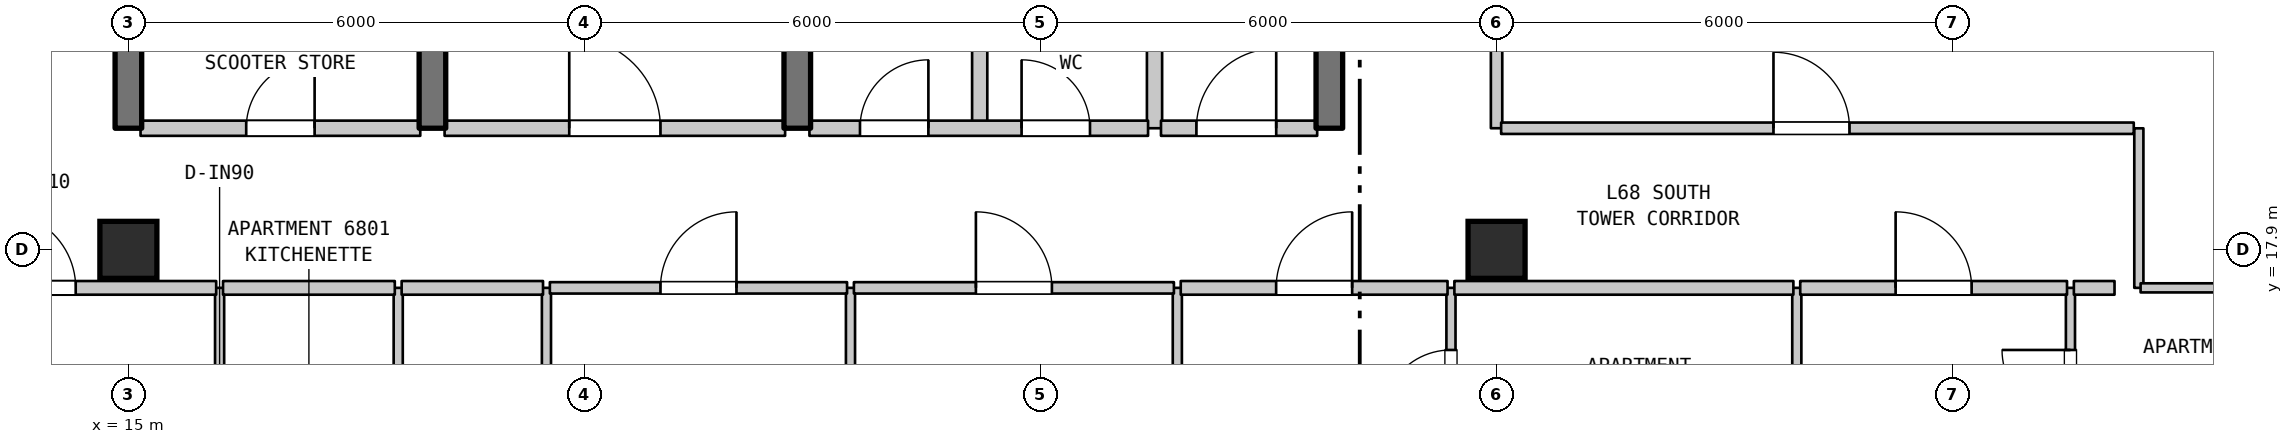
"""IFC4 building model, lengths in metres.
Left out: names, types, materials, properties, quantities, classifications, styles, units other than length and angle.
Written with IfcOpenShell. Run it as: python <this file> out.ifc"""

import sys

from ifc_helpers import new_model, si_unit, direction, frame, frame_2d, origin, origin_2d, place, context, subcontext, project, spatial, rectangle, extrude, element, fill, save


model = new_model("IFC4")
c1 = context("Model", 3, precision=1e-05, world=origin(), true_north=direction((0.0, 1.0)))
c2 = subcontext(c1, "Body", "Model", "MODEL_VIEW")
j1 = project(units=[si_unit("LENGTHUNIT", "METRE"), si_unit("PLANEANGLEUNIT", "RADIAN")], contexts=[c1])
p1 = place(None, origin())
s1 = spatial("IfcSite", under=j1, at=p1, CompositionType="ELEMENT")
p2 = place(p1, origin())
s2 = spatial("IfcBuilding", under=s1, at=p2, CompositionType="ELEMENT")
p3 = place(p2, frame((0.0, 0.0, 273.2)))
s3 = spatial("IfcBuildingStorey", under=s2, at=p3, CompositionType="ELEMENT", Elevation=273.2)
for number, where, z_axis, x_axis in (
    (1, (15.0, 17.9, 0.0), (0.0, 0.0, 1.0), (1.0, 0.0, 0.0)),
    (2, (33.0, 17.9, 0.0), (0.0, 0.0, 1.0), (1.0, 0.0, 0.0)),
):
    element("IfcColumn", number, at=place(p3, frame(where, z_axis=z_axis, x_axis=x_axis)), inside=s3, PredefinedType="COLUMN", context=c2, shape_type="SweptSolid", body=[
        extrude(rectangle(XDim=0.75, YDim=0.75, at=origin_2d()), origin(), (0.0, 0.0, 1.0), 3.7),
    ])
p4 = place(p3, frame((15.0, 19.5, 0.0), z_axis=(0.0, 0.0, 1.0), x_axis=(0.0, 1.0, 0.0)))
e3 = element("IfcWall", 3, at=p4, inside=s3, PredefinedType="SHEAR", context=c2, shape_type="SweptSolid", body=[
    extrude(rectangle(XDim=3.2, YDim=0.35, at=frame_2d((1.6, 0.0))), origin(), (0.0, 0.0, 1.0), 3.39),
])
p5 = place(p3, frame((16.2, 14.2, 0.0), z_axis=(0.0, 0.0, 1.0), x_axis=(0.0, 1.0, 0.0)))
e4 = element("IfcWall", 4, at=p5, inside=s3, PredefinedType="PARTITIONING", context=c2, shape_type="SweptSolid", body=[
    extrude(rectangle(XDim=3.2, YDim=0.12, at=frame_2d((1.6, 0.0))), origin(), (0.0, 0.0, 1.0), 3.39),
])
p6 = place(p5, frame((1.15, 0.0, 0.0)))
e5 = element("IfcOpeningElement", 5, at=p6, cuts=e4, PredefinedType="OPENING", context=c2, shape_type="SweptSolid", body=[
    extrude(rectangle(XDim=0.9, YDim=2.15, at=frame_2d((0.45, 1.075))), frame((0.0, 0.07, 0.0), z_axis=(0.0, -1.0, 0.0), x_axis=(1.0, 0.0, 0.0)), (0.0, 0.0, 1.0), 0.14),
])
p7 = place(p3, frame((18.55, 14.2, 0.0), z_axis=(0.0, 0.0, 1.0), x_axis=(0.0, 1.0, 0.0)))
e6 = element("IfcWall", 6, at=p7, inside=s3, PredefinedType="PARTITIONING", context=c2, shape_type="SweptSolid", body=[
    extrude(rectangle(XDim=3.2, YDim=0.12, at=frame_2d((1.6, 0.0))), origin(), (0.0, 0.0, 1.0), 3.39),
])
p8 = place(p3, frame((19.0, 19.5, 0.0), z_axis=(0.0, 0.0, 1.0), x_axis=(0.0, 1.0, 0.0)))
e7 = element("IfcWall", 7, at=p8, inside=s3, PredefinedType="SHEAR", context=c2, shape_type="SweptSolid", body=[
    extrude(rectangle(XDim=3.2, YDim=0.35, at=frame_2d((1.6, 0.0))), origin(), (0.0, 0.0, 1.0), 3.39),
])
p9 = place(p3, frame((20.5, 7.189, 0.0), z_axis=(0.0, 0.0, 1.0), x_axis=(0.0, 1.0, 0.0)))
e8 = element("IfcWall", 8, at=p9, inside=s3, PredefinedType="PARTITIONING", context=c2, shape_type="SweptSolid", body=[
    extrude(rectangle(XDim=10.211, YDim=0.12, at=frame_2d((5.105, 0.0))), origin(), (0.0, 0.0, 1.0), 3.39),
])
p10 = place(p3, frame((23.8, 19.5, 0.0), z_axis=(0.0, 0.0, 1.0), x_axis=(0.0, 1.0, 0.0)))
e9 = element("IfcWall", 9, at=p10, inside=s3, PredefinedType="SHEAR", context=c2, shape_type="SweptSolid", body=[
    extrude(rectangle(XDim=3.2, YDim=0.35, at=frame_2d((1.6, 0.0))), origin(), (0.0, 0.0, 1.0), 3.39),
])
p11 = place(p3, frame((24.5, 6.71, 0.0), z_axis=(0.0, 0.0, 1.0), x_axis=(0.0, 1.0, 0.0)))
e10 = element("IfcWall", 10, at=p11, inside=s3, PredefinedType="PARTITIONING", context=c2, shape_type="SweptSolid", body=[
    extrude(rectangle(XDim=10.69, YDim=0.12, at=frame_2d((5.345, 0.0))), origin(), (0.0, 0.0, 1.0), 3.39),
])
for number, where, z_axis, x_axis in (
    (11, (26.2, 19.5, 0.0), (0.0, 0.0, 1.0), (0.0, 1.0, 0.0)),
    (12, (28.5, 19.5, 0.0), (0.0, 0.0, 1.0), (0.0, 1.0, 0.0)),
):
    element("IfcWall", number, at=place(p3, frame(where, z_axis=z_axis, x_axis=x_axis)), inside=s3, PredefinedType="STANDARD", context=c2, shape_type="SweptSolid", body=[
        extrude(rectangle(XDim=3.2, YDim=0.2, at=frame_2d((1.6, 0.0))), origin(), (0.0, 0.0, 1.0), 3.39),
    ])
p12 = place(p3, frame((28.8, 6.71, 0.0), z_axis=(0.0, 0.0, 1.0), x_axis=(0.0, 1.0, 0.0)))
e13 = element("IfcWall", 13, at=p12, inside=s3, PredefinedType="PARTITIONING", context=c2, shape_type="SweptSolid", body=[
    extrude(rectangle(XDim=10.69, YDim=0.12, at=frame_2d((5.345, 0.0))), origin(), (0.0, 0.0, 1.0), 3.39),
])
p13 = place(p3, frame((30.8, 19.5, 0.0), z_axis=(0.0, 0.0, 1.0), x_axis=(0.0, 1.0, 0.0)))
e14 = element("IfcWall", 14, at=p13, inside=s3, PredefinedType="SHEAR", context=c2, shape_type="SweptSolid", body=[
    extrude(rectangle(XDim=3.2, YDim=0.35, at=frame_2d((1.6, 0.0))), origin(), (0.0, 0.0, 1.0), 3.39),
])
p14 = place(p3, frame((32.4, 15.008, 0.0), z_axis=(0.0, 0.0, 1.0), x_axis=(0.0, 1.0, 0.0)))
e15 = element("IfcWall", 15, at=p14, inside=s3, PredefinedType="PARTITIONING", context=c2, shape_type="SweptSolid", body=[
    extrude(rectangle(XDim=2.392, YDim=0.12, at=frame_2d((1.196, 0.0))), origin(), (0.0, 0.0, 1.0), 3.39),
])
p15 = place(p14, frame((0.675, 0.0, 0.0)))
e16 = element("IfcOpeningElement", 16, at=p15, cuts=e15, PredefinedType="OPENING", context=c2, shape_type="SweptSolid", body=[
    extrude(rectangle(XDim=0.9, YDim=2.1, at=frame_2d((0.45, 1.05))), frame((0.0, 0.07, 0.0), z_axis=(0.0, -1.0, 0.0), x_axis=(1.0, 0.0, 0.0)), (0.0, 0.0, 1.0), 0.14),
])
p16 = place(p3, frame((33.0, 19.5, 0.0), z_axis=(0.0, 0.0, 1.0), x_axis=(0.0, 1.0, 0.0)))
e17 = element("IfcWall", 17, at=p16, inside=s3, PredefinedType="STANDARD", context=c2, shape_type="SweptSolid", body=[
    extrude(rectangle(XDim=8.4, YDim=0.15, at=frame_2d((4.2, 0.0))), origin(), (0.0, 0.0, 1.0), 3.1),
])
p17 = place(p16, frame((5.18, 0.0, 0.0)))
e18 = element("IfcOpeningElement", 18, at=p17, cuts=e17, PredefinedType="OPENING", context=c2, shape_type="SweptSolid", body=[
    extrude(rectangle(XDim=1.0, YDim=2.15, at=frame_2d((0.5, 1.075))), frame((0.0, 0.085, 0.0), z_axis=(0.0, -1.0, 0.0), x_axis=(1.0, 0.0, 0.0)), (0.0, 0.0, 1.0), 0.17),
])
p18 = place(p3, frame((36.95, 15.008, 0.0), z_axis=(0.0, 0.0, 1.0), x_axis=(0.0, 1.0, 0.0)))
e19 = element("IfcWall", 19, at=p18, inside=s3, PredefinedType="PARTITIONING", context=c2, shape_type="SweptSolid", body=[
    extrude(rectangle(XDim=2.392, YDim=0.12, at=frame_2d((1.196, 0.0))), origin(), (0.0, 0.0, 1.0), 3.39),
])
p19 = place(p3, frame((40.55, 15.008, 0.0), z_axis=(0.0, 0.0, 1.0), x_axis=(0.0, 1.0, 0.0)))
e20 = element("IfcWall", 20, at=p19, inside=s3, PredefinedType="PARTITIONING", context=c2, shape_type="SweptSolid", body=[
    extrude(rectangle(XDim=2.392, YDim=0.12, at=frame_2d((1.196, 0.0))), origin(), (0.0, 0.0, 1.0), 3.39),
])
p20 = place(p19, frame((0.675, 0.0, 0.0)))
e21 = element("IfcOpeningElement", 21, at=p20, cuts=e20, PredefinedType="OPENING", context=c2, shape_type="SweptSolid", body=[
    extrude(rectangle(XDim=0.9, YDim=2.1, at=frame_2d((0.45, 1.05))), frame((0.0, 0.07, 0.0), z_axis=(0.0, -1.0, 0.0), x_axis=(1.0, 0.0, 0.0)), (0.0, 0.0, 1.0), 0.14),
])
p21 = place(p3, frame((41.45, 17.4, 0.0), z_axis=(0.0, 0.0, 1.0), x_axis=(0.0, 1.0, 0.0)))
e22 = element("IfcWall", 22, at=p21, inside=s3, PredefinedType="PARTITIONING", context=c2, shape_type="SweptSolid", body=[
    extrude(rectangle(XDim=2.099, YDim=0.12, at=frame_2d((1.05, 0.0))), origin(), (0.0, 0.0, 1.0), 3.39),
])
p22 = place(p3, frame((12.975, 17.4, 0.0), z_axis=(0.0, 0.0, 1.0), x_axis=(1.0, 0.0, 0.0)))
e23 = element("IfcWall", 23, at=p22, inside=s3, PredefinedType="STANDARD", context=c2, shape_type="SweptSolid", body=[
    extrude(rectangle(XDim=3.18, YDim=0.18, at=frame_2d((1.59, 0.0))), origin(), (0.0, 0.0, 1.0), 3.39),
])
p23 = place(p22, frame((0.332, 0.0, 0.0)))
e24 = element("IfcOpeningElement", 24, at=p23, cuts=e23, PredefinedType="OPENING", context=c2, shape_type="SweptSolid", body=[
    extrude(rectangle(XDim=1.0, YDim=2.15, at=frame_2d((0.5, 1.075))), frame((0.0, 0.1, 0.0), z_axis=(0.0, -1.0, 0.0), x_axis=(1.0, 0.0, 0.0)), (0.0, 0.0, 1.0), 0.2),
])
p24 = place(p3, frame((16.245, 17.4, 0.0), z_axis=(0.0, 0.0, 1.0), x_axis=(1.0, 0.0, 0.0)))
e25 = element("IfcWall", 25, at=p24, inside=s3, PredefinedType="STANDARD", context=c2, shape_type="SweptSolid", body=[
    extrude(rectangle(XDim=2.26, YDim=0.18, at=frame_2d((1.13, 0.0))), origin(), (0.0, 0.0, 1.0), 3.39),
])
p25 = place(p3, frame((18.595, 17.4, 0.0), z_axis=(0.0, 0.0, 1.0), x_axis=(1.0, 0.0, 0.0)))
e26 = element("IfcWall", 26, at=p25, inside=s3, PredefinedType="STANDARD", context=c2, shape_type="SweptSolid", body=[
    extrude(rectangle(XDim=1.86, YDim=0.18, at=frame_2d((0.93, 0.0))), origin(), (0.0, 0.0, 1.0), 3.39),
])
p26 = place(p3, frame((20.545, 17.4, 0.0), z_axis=(0.0, 0.0, 1.0), x_axis=(1.0, 0.0, 0.0)))
e27 = element("IfcWall", 27, at=p26, inside=s3, PredefinedType="STANDARD", context=c2, shape_type="SweptSolid", body=[
    extrude(rectangle(XDim=3.91, YDim=0.15, at=frame_2d((1.955, 0.0))), origin(), (0.0, 0.0, 1.0), 3.39),
])
p27 = place(p26, frame((1.455, 0.0, 0.0)))
e28 = element("IfcOpeningElement", 28, at=p27, cuts=e27, PredefinedType="OPENING", context=c2, shape_type="SweptSolid", body=[
    extrude(rectangle(XDim=1.0, YDim=2.15, at=frame_2d((0.5, 1.075))), frame((0.0, 0.085, 0.0), z_axis=(0.0, -1.0, 0.0), x_axis=(1.0, 0.0, 0.0)), (0.0, 0.0, 1.0), 0.17),
])
p28 = place(p3, frame((24.545, 17.4, 0.0), z_axis=(0.0, 0.0, 1.0), x_axis=(1.0, 0.0, 0.0)))
e29 = element("IfcWall", 29, at=p28, inside=s3, PredefinedType="STANDARD", context=c2, shape_type="SweptSolid", body=[
    extrude(rectangle(XDim=4.21, YDim=0.15, at=frame_2d((2.105, 0.0))), origin(), (0.0, 0.0, 1.0), 3.39),
])
p29 = place(p28, frame((1.605, 0.0, 0.0)))
e30 = element("IfcOpeningElement", 30, at=p29, cuts=e29, PredefinedType="OPENING", context=c2, shape_type="SweptSolid", body=[
    extrude(rectangle(XDim=1.0, YDim=2.15, at=frame_2d((0.5, 1.075))), frame((0.0, 0.085, 0.0), z_axis=(0.0, -1.0, 0.0), x_axis=(1.0, 0.0, 0.0)), (0.0, 0.0, 1.0), 0.17),
])
p30 = place(p3, frame((28.845, 17.4, 0.0), z_axis=(0.0, 0.0, 1.0), x_axis=(1.0, 0.0, 0.0)))
e31 = element("IfcWall", 31, at=p30, inside=s3, PredefinedType="STANDARD", context=c2, shape_type="SweptSolid", body=[
    extrude(rectangle(XDim=3.51, YDim=0.18, at=frame_2d((1.755, 0.0))), origin(), (0.0, 0.0, 1.0), 3.39),
])
p31 = place(p30, frame((1.255, 0.0, 0.0)))
e32 = element("IfcOpeningElement", 32, at=p31, cuts=e31, PredefinedType="OPENING", context=c2, shape_type="SweptSolid", body=[
    extrude(rectangle(XDim=1.0, YDim=2.15, at=frame_2d((0.5, 1.075))), frame((0.0, 0.1, 0.0), z_axis=(0.0, -1.0, 0.0), x_axis=(1.0, 0.0, 0.0)), (0.0, 0.0, 1.0), 0.2),
])
p32 = place(p3, frame((32.445, 17.4, 0.0), z_axis=(0.0, 0.0, 1.0), x_axis=(1.0, 0.0, 0.0)))
e33 = element("IfcWall", 33, at=p32, inside=s3, PredefinedType="STANDARD", context=c2, shape_type="SweptSolid", body=[
    extrude(rectangle(XDim=4.46, YDim=0.18, at=frame_2d((2.23, 0.0))), origin(), (0.0, 0.0, 1.0), 3.39),
])
p33 = place(p3, frame((36.995, 17.4, 0.0), z_axis=(0.0, 0.0, 1.0), x_axis=(1.0, 0.0, 0.0)))
e34 = element("IfcWall", 34, at=p33, inside=s3, PredefinedType="STANDARD", context=c2, shape_type="SweptSolid", body=[
    extrude(rectangle(XDim=3.51, YDim=0.18, at=frame_2d((1.755, 0.0))), origin(), (0.0, 0.0, 1.0), 3.39),
])
p34 = place(p33, frame((1.255, 0.0, 0.0)))
e35 = element("IfcOpeningElement", 35, at=p34, cuts=e34, PredefinedType="OPENING", context=c2, shape_type="SweptSolid", body=[
    extrude(rectangle(XDim=1.0, YDim=2.15, at=frame_2d((0.5, 1.075))), frame((0.0, 0.1, 0.0), z_axis=(0.0, -1.0, 0.0), x_axis=(1.0, 0.0, 0.0)), (0.0, 0.0, 1.0), 0.2),
])
p35 = place(p3, frame((40.595, 17.4, 0.0), z_axis=(0.0, 0.0, 1.0), x_axis=(1.0, 0.0, 0.0)))
e36 = element("IfcWall", 36, at=p35, inside=s3, PredefinedType="STANDARD", context=c2, shape_type="SweptSolid", body=[
    extrude(rectangle(XDim=0.535, YDim=0.18, at=frame_2d((0.268, 0.0))), origin(), (0.0, 0.0, 1.0), 3.39),
])
p36 = place(p3, frame((41.473, 17.4, 0.0), z_axis=(0.0, 0.0, 1.0), x_axis=(1.0, 0.0, 0.0)))
e37 = element("IfcWall", 37, at=p36, inside=s3, PredefinedType="PARTITIONING", context=c2, shape_type="SweptSolid", body=[
    extrude(rectangle(XDim=2.031, YDim=0.12, at=frame_2d((1.016, 0.0))), origin(), (0.0, 0.0, 1.0), 3.39),
])
p37 = place(p3, frame((15.16, 19.5, 0.0), z_axis=(0.0, 0.0, 1.0), x_axis=(1.0, 0.0, 0.0)))
e38 = element("IfcWall", 38, at=p37, inside=s3, PredefinedType="STANDARD", context=c2, shape_type="SweptSolid", body=[
    extrude(rectangle(XDim=3.68, YDim=0.2, at=frame_2d((1.84, 0.0))), origin(), (0.0, 0.0, 1.0), 3.39),
])
p38 = place(p37, frame((1.39, 0.0, 0.0)))
e39 = element("IfcOpeningElement", 39, at=p38, cuts=e38, PredefinedType="OPENING", context=c2, shape_type="SweptSolid", body=[
    extrude(rectangle(XDim=0.9, YDim=2.15, at=frame_2d((0.45, 1.075))), frame((0.0, 0.11, 0.0), z_axis=(0.0, -1.0, 0.0), x_axis=(1.0, 0.0, 0.0)), (0.0, 0.0, 1.0), 0.22),
])
p39 = place(p3, frame((19.16, 19.5, 0.0), z_axis=(0.0, 0.0, 1.0), x_axis=(1.0, 0.0, 0.0)))
e40 = element("IfcWall", 40, at=p39, inside=s3, PredefinedType="STANDARD", context=c2, shape_type="SweptSolid", body=[
    extrude(rectangle(XDim=4.48, YDim=0.2, at=frame_2d((2.24, 0.0))), origin(), (0.0, 0.0, 1.0), 3.39),
])
p40 = place(p39, frame((1.64, 0.0, 0.0)))
e41 = element("IfcOpeningElement", 41, at=p40, cuts=e40, PredefinedType="OPENING", context=c2, shape_type="SweptSolid", body=[
    extrude(rectangle(XDim=1.2, YDim=2.2, at=frame_2d((0.6, 1.1))), frame((0.0, 0.11, 0.0), z_axis=(0.0, -1.0, 0.0), x_axis=(1.0, 0.0, 0.0)), (0.0, 0.0, 1.0), 0.22),
])
p41 = place(p3, frame((23.96, 19.5, 0.0), z_axis=(0.0, 0.0, 1.0), x_axis=(1.0, 0.0, 0.0)))
e42 = element("IfcWall", 42, at=p41, inside=s3, PredefinedType="STANDARD", context=c2, shape_type="SweptSolid", body=[
    extrude(rectangle(XDim=4.455, YDim=0.2, at=frame_2d((2.228, 0.0))), origin(), (0.0, 0.0, 1.0), 3.39),
])
p42 = place(p41, frame((0.665, 0.0, 0.0)))
e43 = element("IfcOpeningElement", 43, at=p42, cuts=e42, PredefinedType="OPENING", context=c2, shape_type="SweptSolid", body=[
    extrude(rectangle(XDim=0.9, YDim=2.15, at=frame_2d((0.45, 1.075))), frame((0.0, 0.11, 0.0), z_axis=(0.0, -1.0, 0.0), x_axis=(1.0, 0.0, 0.0)), (0.0, 0.0, 1.0), 0.22),
])
p43 = place(p41, frame((2.791, 0.0, 0.0)))
e44 = element("IfcOpeningElement", 44, at=p43, cuts=e42, PredefinedType="OPENING", context=c2, shape_type="SweptSolid", body=[
    extrude(rectangle(XDim=0.9, YDim=2.15, at=frame_2d((0.45, 1.075))), frame((0.0, 0.11, 0.0), z_axis=(0.0, -1.0, 0.0), x_axis=(1.0, 0.0, 0.0)), (0.0, 0.0, 1.0), 0.22),
])
p44 = place(p3, frame((28.585, 19.5, 0.0), z_axis=(0.0, 0.0, 1.0), x_axis=(1.0, 0.0, 0.0)))
e45 = element("IfcWall", 45, at=p44, inside=s3, PredefinedType="STANDARD", context=c2, shape_type="SweptSolid", body=[
    extrude(rectangle(XDim=2.055, YDim=0.2, at=frame_2d((1.027, 0.0))), origin(), (0.0, 0.0, 1.0), 3.39),
])
p45 = place(p44, frame((0.466, 0.0, 0.0)))
e46 = element("IfcOpeningElement", 46, at=p45, cuts=e45, PredefinedType="OPENING", context=c2, shape_type="SweptSolid", body=[
    extrude(rectangle(XDim=1.05, YDim=2.15, at=frame_2d((0.525, 1.075))), frame((0.0, 0.11, 0.0), z_axis=(0.0, -1.0, 0.0), x_axis=(1.0, 0.0, 0.0)), (0.0, 0.0, 1.0), 0.22),
])
p46 = place(p3, frame((33.06, 19.5, 0.0), z_axis=(0.0, 0.0, 1.0), x_axis=(1.0, 0.0, 0.0)))
e47 = element("IfcWall", 47, at=p46, inside=s3, PredefinedType="STANDARD", context=c2, shape_type="SweptSolid", body=[
    extrude(rectangle(XDim=8.323, YDim=0.15, at=frame_2d((4.162, 0.0))), origin(), (0.0, 0.0, 1.0), 3.39),
])
p47 = place(p46, frame((3.583, 0.0, 0.0)))
e48 = element("IfcOpeningElement", 48, at=p47, cuts=e47, PredefinedType="OPENING", context=c2, shape_type="SweptSolid", body=[
    extrude(rectangle(XDim=1.0, YDim=2.15, at=frame_2d((0.5, 1.075))), frame((0.0, 0.085, 0.0), z_axis=(0.0, -1.0, 0.0), x_axis=(1.0, 0.0, 0.0)), (0.0, 0.0, 1.0), 0.17),
])
p48 = place(p15, origin())
e49 = element("IfcDoor", 49, at=p48, inside=s3, OperationType="SINGLE_SWING_LEFT", PredefinedType="DOOR", context=c2, shape_type="SweptSolid", body=[
    extrude(rectangle(XDim=0.9, YDim=2.1, at=frame_2d((0.45, 1.05))), frame((0.0, 0.025, 0.0), z_axis=(0.0, -1.0, 0.0), x_axis=(1.0, 0.0, 0.0)), (0.0, 0.0, 1.0), 0.05),
])
fill(e16, e49)
p49 = place(p20, origin())
e50 = element("IfcDoor", 50, at=p49, inside=s3, OperationType="SINGLE_SWING_RIGHT", PredefinedType="DOOR", context=c2, shape_type="SweptSolid", body=[
    extrude(rectangle(XDim=0.9, YDim=2.1, at=frame_2d((0.45, 1.05))), frame((0.0, 0.025, 0.0), z_axis=(0.0, -1.0, 0.0), x_axis=(1.0, 0.0, 0.0)), (0.0, 0.0, 1.0), 0.05),
])
fill(e21, e50)
p50 = place(p23, origin())
e51 = element("IfcDoor", 51, at=p50, inside=s3, OperationType="SINGLE_SWING_LEFT", PredefinedType="DOOR", context=c2, shape_type="SweptSolid", body=[
    extrude(rectangle(XDim=1.0, YDim=2.15, at=frame_2d((0.5, 1.075))), frame((0.0, 0.025, 0.0), z_axis=(0.0, -1.0, 0.0), x_axis=(1.0, 0.0, 0.0)), (0.0, 0.0, 1.0), 0.05),
])
fill(e24, e51)
p51 = place(p27, origin())
e52 = element("IfcDoor", 52, at=p51, inside=s3, OperationType="SINGLE_SWING_RIGHT", PredefinedType="DOOR", context=c2, shape_type="SweptSolid", body=[
    extrude(rectangle(XDim=1.0, YDim=2.15, at=frame_2d((0.5, 1.075))), frame((0.0, 0.025, 0.0), z_axis=(0.0, -1.0, 0.0), x_axis=(1.0, 0.0, 0.0)), (0.0, 0.0, 1.0), 0.05),
])
fill(e28, e52)
p52 = place(p29, origin())
e53 = element("IfcDoor", 53, at=p52, inside=s3, OperationType="SINGLE_SWING_LEFT", PredefinedType="DOOR", context=c2, shape_type="SweptSolid", body=[
    extrude(rectangle(XDim=1.0, YDim=2.15, at=frame_2d((0.5, 1.075))), frame((0.0, 0.025, 0.0), z_axis=(0.0, -1.0, 0.0), x_axis=(1.0, 0.0, 0.0)), (0.0, 0.0, 1.0), 0.05),
])
fill(e30, e53)
p53 = place(p31, origin())
e54 = element("IfcDoor", 54, at=p53, inside=s3, OperationType="SINGLE_SWING_RIGHT", PredefinedType="DOOR", context=c2, shape_type="SweptSolid", body=[
    extrude(rectangle(XDim=1.0, YDim=2.15, at=frame_2d((0.5, 1.075))), frame((0.0, 0.025, 0.0), z_axis=(0.0, -1.0, 0.0), x_axis=(1.0, 0.0, 0.0)), (0.0, 0.0, 1.0), 0.05),
])
fill(e32, e54)
p54 = place(p34, origin())
e55 = element("IfcDoor", 55, at=p54, inside=s3, OperationType="SINGLE_SWING_LEFT", PredefinedType="DOOR", context=c2, shape_type="SweptSolid", body=[
    extrude(rectangle(XDim=1.0, YDim=2.15, at=frame_2d((0.5, 1.075))), frame((0.0, 0.025, 0.0), z_axis=(0.0, -1.0, 0.0), x_axis=(1.0, 0.0, 0.0)), (0.0, 0.0, 1.0), 0.05),
])
fill(e35, e55)
p55 = place(p38, origin())
e56 = element("IfcDoor", 56, at=p55, inside=s3, OperationType="SINGLE_SWING_RIGHT", PredefinedType="DOOR", context=c2, shape_type="SweptSolid", body=[
    extrude(rectangle(XDim=0.9, YDim=2.15, at=frame_2d((0.45, 1.075))), frame((0.0, 0.025, 0.0), z_axis=(0.0, -1.0, 0.0), x_axis=(1.0, 0.0, 0.0)), (0.0, 0.0, 1.0), 0.05),
])
fill(e39, e56)
p56 = place(p40, origin())
e57 = element("IfcDoor", 57, at=p56, inside=s3, OperationType="SINGLE_SWING_LEFT", PredefinedType="DOOR", context=c2, shape_type="SweptSolid", body=[
    extrude(rectangle(XDim=1.2, YDim=2.2, at=frame_2d((0.6, 1.1))), frame((0.0, 0.025, 0.0), z_axis=(0.0, -1.0, 0.0), x_axis=(1.0, 0.0, 0.0)), (0.0, 0.0, 1.0), 0.05),
])
fill(e41, e57)
p57 = place(p42, origin())
e58 = element("IfcDoor", 58, at=p57, inside=s3, OperationType="SINGLE_SWING_RIGHT", PredefinedType="DOOR", context=c2, shape_type="SweptSolid", body=[
    extrude(rectangle(XDim=0.9, YDim=2.15, at=frame_2d((0.45, 1.075))), frame((0.0, 0.025, 0.0), z_axis=(0.0, -1.0, 0.0), x_axis=(1.0, 0.0, 0.0)), (0.0, 0.0, 1.0), 0.05),
])
fill(e43, e58)
p58 = place(p43, origin())
e59 = element("IfcDoor", 59, at=p58, inside=s3, OperationType="SINGLE_SWING_LEFT", PredefinedType="DOOR", context=c2, shape_type="SweptSolid", body=[
    extrude(rectangle(XDim=0.9, YDim=2.15, at=frame_2d((0.45, 1.075))), frame((0.0, 0.025, 0.0), z_axis=(0.0, -1.0, 0.0), x_axis=(1.0, 0.0, 0.0)), (0.0, 0.0, 1.0), 0.05),
])
fill(e44, e59)
p59 = place(p45, origin())
e60 = element("IfcDoor", 60, at=p59, inside=s3, OperationType="SINGLE_SWING_RIGHT", PredefinedType="DOOR", context=c2, shape_type="SweptSolid", body=[
    extrude(rectangle(XDim=1.05, YDim=2.15, at=frame_2d((0.525, 1.075))), frame((0.0, 0.025, 0.0), z_axis=(0.0, -1.0, 0.0), x_axis=(1.0, 0.0, 0.0)), (0.0, 0.0, 1.0), 0.05),
])
fill(e46, e60)
p60 = place(p47, origin())
e61 = element("IfcDoor", 61, at=p60, inside=s3, OperationType="SINGLE_SWING_LEFT", PredefinedType="DOOR", context=c2, shape_type="SweptSolid", body=[
    extrude(rectangle(XDim=1.0, YDim=2.15, at=frame_2d((0.5, 1.075))), frame((0.0, 0.025, 0.0), z_axis=(0.0, -1.0, 0.0), x_axis=(1.0, 0.0, 0.0)), (0.0, 0.0, 1.0), 0.05),
])
fill(e48, e61)
save(model, sys.argv[1])
